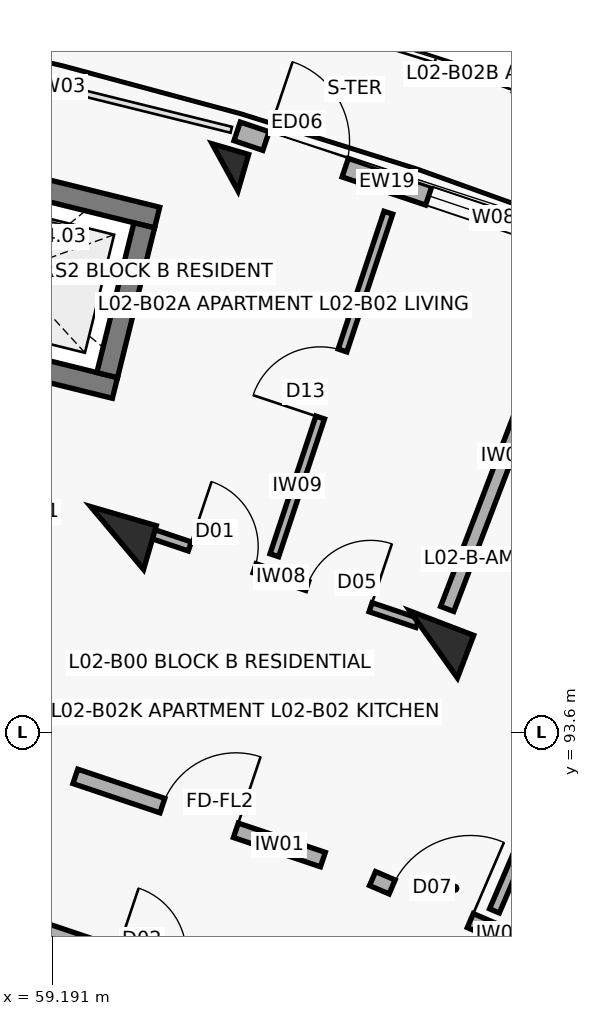
"""IFC4 building model, lengths in metres.
Left out: names, types, materials, properties, quantities, classifications, styles, units other than length and angle.
Written with IfcOpenShell. Run it as: python <this file> out.ifc"""

import sys

from ifc_helpers import new_model, si_unit, direction, frame, frame_2d, origin, origin_2d, place, context, subcontext, project, spatial, rectangle, extrude, element, fill, save


model = new_model("IFC4")
c1 = context("Model", 3, precision=1e-05, world=origin(), true_north=direction((0.0, 1.0)))
c2 = subcontext(c1, "Body", "Model", "MODEL_VIEW")
j1 = project(units=[si_unit("LENGTHUNIT", "METRE"), si_unit("PLANEANGLEUNIT", "RADIAN")], contexts=[c1])
p1 = place(None, origin())
s1 = spatial("IfcSite", under=j1, at=p1, CompositionType="ELEMENT")
p2 = place(p1, origin())
s2 = spatial("IfcBuilding", under=s1, at=p2, CompositionType="ELEMENT")
p3 = place(p2, frame((0.0, 0.0, 8.1)))
s3 = spatial("IfcBuildingStorey", under=s2, at=p3, CompositionType="ELEMENT", Elevation=8.1)
p4 = place(p3, frame((60.046, 96.153, 0.0), z_axis=(0.0, 0.0, 1.0), x_axis=(0.27966144946, 0.96009867914, 0.0)))
e1 = element("IfcColumn", 1, at=p4, inside=s3, PredefinedType="COLUMN", context=c2, shape_type="SweptSolid", body=[
    extrude(rectangle(XDim=0.6, YDim=0.9, at=origin_2d()), origin(), (0.0, 0.0, 1.0), 3.1),
])
p5 = place(p3, frame((61.467, 101.031, 0.0), z_axis=(0.0, 0.0, 1.0), x_axis=(0.27966144946, 0.96009867914, 0.0)))
e2 = element("IfcColumn", 2, at=p5, inside=s3, PredefinedType="COLUMN", context=c2, shape_type="SweptSolid", body=[
    extrude(rectangle(XDim=0.5, YDim=0.5, at=origin_2d()), origin(), (0.0, 0.0, 1.0), 3.1),
])
p6 = place(p3, frame((64.21, 94.753, 0.0), z_axis=(0.0, 0.0, 1.0), x_axis=(0.357064076459, 0.934079892355, 0.0)))
e3 = element("IfcColumn", 3, at=p6, inside=s3, PredefinedType="COLUMN", context=c2, shape_type="SweptSolid", body=[
    extrude(rectangle(XDim=0.6, YDim=0.9, at=origin_2d()), origin(), (0.0, 0.0, 1.0), 3.1),
])
p7 = place(p3, frame((61.625, 101.504, 0.0), z_axis=(0.0, 0.0, 1.0), x_axis=(0.947867898788, -0.318663531717, 0.0)))
e4 = element("IfcWall", 4, at=p7, inside=s3, PredefinedType="SOLIDWALL", context=c2, shape_type="SweptSolid", body=[
    extrude(rectangle(XDim=4.809, YDim=0.258, at=frame_2d((2.405, 0.0))), origin(), (0.0, 0.0, 1.0), 2.25),
])
p8 = place(p7, frame((0.4, 0.0, 0.0)))
e5 = element("IfcOpeningElement", 5, at=p8, cuts=e4, PredefinedType="OPENING", context=c2, shape_type="SweptSolid", body=[
    extrude(rectangle(XDim=1.1, YDim=2.15, at=frame_2d((0.55, 1.075))), frame((0.0, 0.139, 0.0), z_axis=(0.0, -1.0, 0.0), x_axis=(1.0, 0.0, 0.0)), (0.0, 0.0, 1.0), 0.278),
])
p9 = place(p7, frame((2.659, 0.0, 0.35)))
e6 = element("IfcOpeningElement", 6, at=p9, cuts=e4, PredefinedType="OPENING", context=c2, shape_type="SweptSolid", body=[
    extrude(rectangle(XDim=1.8, YDim=1.65, at=frame_2d((0.9, 0.825))), frame((0.0, 0.139, 0.0), z_axis=(0.0, -1.0, 0.0), x_axis=(1.0, 0.0, 0.0)), (0.0, 0.0, 1.0), 0.278),
])
p10 = place(p3, frame((60.018, 98.128, 0.0), z_axis=(0.0, 0.0, 1.0), x_axis=(-0.970707542441, 0.240264160972, 0.0)))
e7 = element("IfcWall", 7, at=p10, inside=s3, PredefinedType="SHEAR", context=c2, shape_type="SweptSolid", body=[
    extrude(rectangle(XDim=3.39, YDim=0.28, at=frame_2d((1.695, 0.0))), origin(), (0.0, 0.0, 1.0), 3.1),
])
p11 = place(p10, frame((1.095, 0.0, 0.0)))
e8 = element("IfcOpeningElement", 8, at=p11, cuts=e7, PredefinedType="OPENING", context=c2, shape_type="SweptSolid", body=[
    extrude(rectangle(XDim=1.2, YDim=2.15, at=frame_2d((0.6, 1.075))), frame((0.0, 0.15, 0.0), z_axis=(0.0, -1.0, 0.0), x_axis=(1.0, 0.0, 0.0)), (0.0, 0.0, 1.0), 0.3),
])
p12 = place(p3, frame((60.573, 100.37, 0.0), z_axis=(0.0, 0.0, 1.0), x_axis=(-0.970711699588, 0.240247364777, 0.0)))
e9 = element("IfcWall", 9, at=p12, inside=s3, PredefinedType="SHEAR", context=c2, shape_type="SweptSolid", body=[
    extrude(rectangle(XDim=3.39, YDim=0.28, at=frame_2d((1.695, 0.0))), origin(), (0.0, 0.0, 1.0), 3.1),
])
p13 = place(p3, frame((59.915, 98.297, 0.0), z_axis=(0.0, 0.0, 1.0), x_axis=(0.2402993748, 0.970698825832, 0.0)))
e10 = element("IfcWall", 10, at=p13, inside=s3, PredefinedType="SHEAR", context=c2, shape_type="SweptSolid", body=[
    extrude(rectangle(XDim=2.03, YDim=0.28, at=frame_2d((1.015, 0.0))), origin(), (0.0, 0.0, 1.0), 3.1),
])
p14 = place(p3, frame((59.497, 93.018, 0.0), z_axis=(0.0, 0.0, 1.0), x_axis=(0.947863007629, -0.318678080151, 0.0)))
e11 = element("IfcWall", 11, at=p14, inside=s3, PredefinedType="SOLIDWALL", context=c2, shape_type="SweptSolid", body=[
    extrude(rectangle(XDim=3.436, YDim=0.2, at=frame_2d((1.718, 0.0))), origin(), (0.0, 0.0, 1.0), 2.08),
])
p15 = place(p14, frame((1.208, 0.0, 0.0)))
e12 = element("IfcOpeningElement", 12, at=p15, cuts=e11, PredefinedType="OPENING", context=c2, shape_type="SweptSolid", body=[
    extrude(rectangle(XDim=1.02, YDim=2.15, at=frame_2d((0.51, 1.075))), frame((0.0, 0.11, 0.0), z_axis=(0.0, -1.0, 0.0), x_axis=(1.0, 0.0, 0.0)), (0.0, 0.0, 1.0), 0.22),
])
p16 = place(p3, frame((58.923, 91.049, 0.0), z_axis=(0.0, 0.0, 1.0), x_axis=(0.94787351033, -0.318646839643, 0.0)))
e13 = element("IfcWall", 13, at=p16, inside=s3, PredefinedType="SOLIDWALL", context=c2, shape_type="SweptSolid", body=[
    extrude(rectangle(XDim=3.269, YDim=0.19, at=frame_2d((1.634, 0.0))), origin(), (0.0, 0.0, 1.0), 2.08),
])
p17 = place(p16, frame((1.174, 0.0, 0.0)))
e14 = element("IfcOpeningElement", 14, at=p17, cuts=e13, PredefinedType="OPENING", context=c2, shape_type="SweptSolid", body=[
    extrude(rectangle(XDim=0.92, YDim=2.1, at=frame_2d((0.46, 1.05))), frame((0.0, 0.105, 0.0), z_axis=(0.0, -1.0, 0.0), x_axis=(1.0, 0.0, 0.0)), (0.0, 0.0, 1.0), 0.21),
])
p18 = place(p3, frame((60.386, 96.25, 0.0), z_axis=(0.0, 0.0, 1.0), x_axis=(0.947879193428, -0.318629933725, 0.0)))
e15 = element("IfcWall", 15, at=p18, inside=s3, PredefinedType="PARTITIONING", context=c2, shape_type="SweptSolid", body=[
    extrude(rectangle(XDim=3.81, YDim=0.125, at=frame_2d((1.905, 0.0))), origin(), (0.0, 0.0, 1.0), 2.08),
])
p19 = place(p18, frame((0.65, 0.0, 0.0)))
e16 = element("IfcOpeningElement", 16, at=p19, cuts=e15, PredefinedType="OPENING", context=c2, shape_type="SweptSolid", body=[
    extrude(rectangle(XDim=0.9, YDim=2.1, at=frame_2d((0.45, 1.05))), frame((0.0, 0.073, 0.0), z_axis=(0.0, -1.0, 0.0), x_axis=(1.0, 0.0, 0.0)), (0.0, 0.0, 1.0), 0.145),
])
p20 = place(p18, frame((2.28, 0.0, 0.0)))
e17 = element("IfcOpeningElement", 17, at=p20, cuts=e15, PredefinedType="OPENING", context=c2, shape_type="SweptSolid", body=[
    extrude(rectangle(XDim=0.88, YDim=2.1, at=frame_2d((0.44, 1.05))), frame((0.0, 0.073, 0.0), z_axis=(0.0, -1.0, 0.0), x_axis=(1.0, 0.0, 0.0)), (0.0, 0.0, 1.0), 0.145),
])
p21 = place(p3, frame((62.115, 95.927, 0.0), z_axis=(0.0, 0.0, 1.0), x_axis=(0.31574970662, 0.94884251737, 0.0)))
e18 = element("IfcWall", 18, at=p21, inside=s3, PredefinedType="PARTITIONING", context=c2, shape_type="SweptSolid", body=[
    extrude(rectangle(XDim=4.75, YDim=0.12, at=frame_2d((2.375, 0.0))), origin(), (0.0, 0.0, 1.0), 2.08),
])
p22 = place(p21, frame((1.91, 0.0, 0.0)))
e19 = element("IfcOpeningElement", 19, at=p22, cuts=e18, PredefinedType="OPENING", context=c2, shape_type="SweptSolid", body=[
    extrude(rectangle(XDim=0.93, YDim=2.1, at=frame_2d((0.465, 1.05))), frame((0.0, 0.07, 0.0), z_axis=(0.0, -1.0, 0.0), x_axis=(1.0, 0.0, 0.0)), (0.0, 0.0, 1.0), 0.14),
])
p23 = place(p3, frame((63.407, 91.673, 0.0), z_axis=(0.0, 0.0, 1.0), x_axis=(0.918718172399, -0.394913813008, 0.0)))
e20 = element("IfcWall", 20, at=p23, inside=s3, PredefinedType="SOLIDWALL", context=c2, shape_type="SweptSolid", body=[
    extrude(rectangle(XDim=3.436, YDim=0.2, at=frame_2d((1.718, 0.0))), origin(), (0.0, 0.0, 1.0), 2.08),
])
p24 = place(p23, frame((0.28, 0.0, 0.0)))
e21 = element("IfcOpeningElement", 21, at=p24, cuts=e20, PredefinedType="OPENING", context=c2, shape_type="SweptSolid", body=[
    extrude(rectangle(XDim=1.12, YDim=2.15, at=frame_2d((0.56, 1.075))), frame((0.0, 0.11, 0.0), z_axis=(0.0, -1.0, 0.0), x_axis=(1.0, 0.0, 0.0)), (0.0, 0.0, 1.0), 0.22),
])
p25 = place(p23, frame((2.266, 0.0, 0.0)))
e22 = element("IfcOpeningElement", 22, at=p25, cuts=e20, PredefinedType="OPENING", context=c2, shape_type="SweptSolid", body=[
    extrude(rectangle(XDim=0.95, YDim=2.1, at=frame_2d((0.475, 1.05))), frame((0.0, 0.11, 0.0), z_axis=(0.0, -1.0, 0.0), x_axis=(1.0, 0.0, 0.0)), (0.0, 0.0, 1.0), 0.22),
])
p26 = place(p3, frame((65.01, 91.247, 0.0), z_axis=(0.0, 0.0, 1.0), x_axis=(0.393511564709, 0.919319666079, 0.0)))
e23 = element("IfcWall", 23, at=p26, inside=s3, PredefinedType="PARTITIONING", context=c2, shape_type="SweptSolid", body=[
    extrude(rectangle(XDim=7.95, YDim=0.14, at=frame_2d((3.975, 0.0))), origin(), (0.0, 0.0, 1.0), 2.08),
])
p27 = place(p26, frame((6.05, 0.0, 0.0)))
e24 = element("IfcOpeningElement", 24, at=p27, cuts=e23, PredefinedType="OPENING", context=c2, shape_type="SweptSolid", body=[
    extrude(rectangle(XDim=0.92, YDim=2.1, at=frame_2d((0.46, 1.05))), frame((0.0, 0.08, 0.0), z_axis=(0.0, -1.0, 0.0), x_axis=(1.0, 0.0, 0.0)), (0.0, 0.0, 1.0), 0.16),
])
p28 = place(p3, frame((64.389, 95.22, 0.0), z_axis=(0.0, 0.0, 1.0), x_axis=(0.357064016205, 0.934079915388, 0.0)))
e25 = element("IfcWall", 25, at=p28, inside=s3, PredefinedType="SOLIDWALL", context=c2, shape_type="SweptSolid", body=[
    extrude(rectangle(XDim=4.35, YDim=0.185, at=frame_2d((2.175, 0.0))), origin(), (0.0, 0.0, 1.0), 2.08),
])
p29 = place(p8, origin())
e26 = element("IfcDoor", 26, at=p29, inside=s3, OperationType="SINGLE_SWING_LEFT", PredefinedType="DOOR", context=c2, shape_type="SweptSolid", body=[
    extrude(rectangle(XDim=1.1, YDim=2.15, at=frame_2d((0.55, 1.075))), frame((0.0, 0.025, 0.0), z_axis=(0.0, -1.0, 0.0), x_axis=(1.0, 0.0, 0.0)), (0.0, 0.0, 1.0), 0.05),
])
fill(e5, e26)
p30 = place(p9, origin())
e27 = element("IfcWindow", 27, at=p30, inside=s3, PartitioningType="TRIPLE_PANEL_VERTICAL", PredefinedType="WINDOW", context=c2, shape_type="SweptSolid", body=[
    extrude(rectangle(XDim=1.8, YDim=1.65, at=frame_2d((0.9, 0.825))), frame((0.0, 0.03, 0.0), z_axis=(0.0, -1.0, 0.0), x_axis=(1.0, 0.0, 0.0)), (0.0, 0.0, 1.0), 0.06),
])
fill(e6, e27)
p31 = place(p15, origin())
e28 = element("IfcDoor", 28, at=p31, inside=s3, OperationType="SINGLE_SWING_RIGHT", PredefinedType="DOOR", context=c2, shape_type="SweptSolid", body=[
    extrude(rectangle(XDim=1.02, YDim=2.15, at=frame_2d((0.51, 1.075))), frame((0.0, 0.025, 0.0), z_axis=(0.0, -1.0, 0.0), x_axis=(1.0, 0.0, 0.0)), (0.0, 0.0, 1.0), 0.05),
])
fill(e12, e28)
p32 = place(p19, origin())
e29 = element("IfcDoor", 29, at=p32, inside=s3, OperationType="SINGLE_SWING_LEFT", PredefinedType="DOOR", context=c2, shape_type="SweptSolid", body=[
    extrude(rectangle(XDim=0.9, YDim=2.1, at=frame_2d((0.45, 1.05))), frame((0.0, 0.025, 0.0), z_axis=(0.0, -1.0, 0.0), x_axis=(1.0, 0.0, 0.0)), (0.0, 0.0, 1.0), 0.05),
])
fill(e16, e29)
p33 = place(p20, origin())
e30 = element("IfcDoor", 30, at=p33, inside=s3, OperationType="SINGLE_SWING_RIGHT", PredefinedType="DOOR", context=c2, shape_type="SweptSolid", body=[
    extrude(rectangle(XDim=0.88, YDim=2.1, at=frame_2d((0.44, 1.05))), frame((0.0, 0.025, 0.0), z_axis=(0.0, -1.0, 0.0), x_axis=(1.0, 0.0, 0.0)), (0.0, 0.0, 1.0), 0.05),
])
fill(e17, e30)
p34 = place(p22, origin())
e31 = element("IfcDoor", 31, at=p34, inside=s3, OperationType="SINGLE_SWING_LEFT", PredefinedType="DOOR", context=c2, shape_type="SweptSolid", body=[
    extrude(rectangle(XDim=0.93, YDim=2.1, at=frame_2d((0.465, 1.05))), frame((0.0, 0.025, 0.0), z_axis=(0.0, -1.0, 0.0), x_axis=(1.0, 0.0, 0.0)), (0.0, 0.0, 1.0), 0.05),
])
fill(e19, e31)
p35 = place(p24, origin())
e32 = element("IfcDoor", 32, at=p35, inside=s3, OperationType="SINGLE_SWING_RIGHT", PredefinedType="DOOR", context=c2, shape_type="SweptSolid", body=[
    extrude(rectangle(XDim=1.12, YDim=2.15, at=frame_2d((0.56, 1.075))), frame((0.0, 0.025, 0.0), z_axis=(0.0, -1.0, 0.0), x_axis=(1.0, 0.0, 0.0)), (0.0, 0.0, 1.0), 0.05),
])
fill(e21, e32)
save(model, sys.argv[1])
